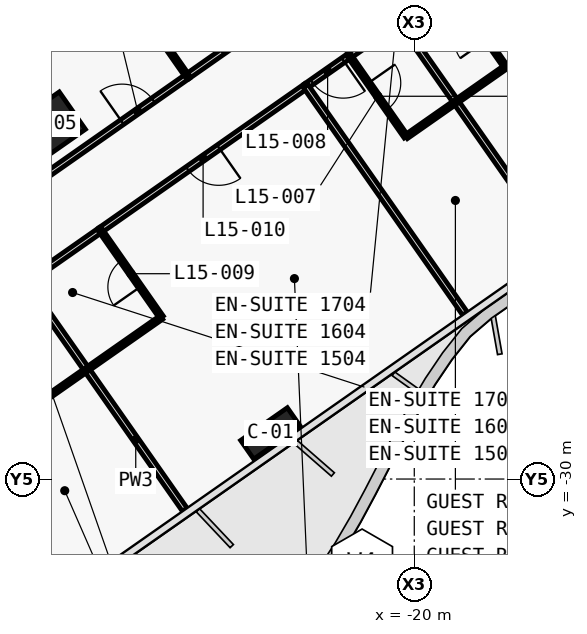
"""IFC4 building model, lengths in metres.
Left out: names, types, materials, properties, quantities, classifications, styles, units other than length and angle.
Written with IfcOpenShell. Run it as: python <this file> out.ifc"""

import sys

from ifc_helpers import new_model, si_unit, direction, frame, frame_2d, origin, origin_2d, place, context, subcontext, project, spatial, rectangle, extrude, element, fill, save


model = new_model("IFC4")
c1 = context("Model", 3, precision=1e-05, world=origin(), true_north=direction((0.0, 1.0)))
c2 = subcontext(c1, "Body", "Model", "MODEL_VIEW")
j1 = project(units=[si_unit("LENGTHUNIT", "METRE"), si_unit("PLANEANGLEUNIT", "RADIAN")], contexts=[c1])
p1 = place(None, origin())
s1 = spatial("IfcSite", under=j1, at=p1, CompositionType="ELEMENT")
p2 = place(p1, origin())
s2 = spatial("IfcBuilding", under=s1, at=p2, CompositionType="ELEMENT")
p3 = place(p2, frame((0.0, 0.0, 79.7)))
s3 = spatial("IfcBuildingStorey", under=s2, at=p3, CompositionType="ELEMENT", Elevation=79.7)
p4 = place(p3, frame((-23.782, -28.799, 0.0), z_axis=(0.0, 0.0, 1.0), x_axis=(-0.819152044289, -0.573576436351, 0.0)))
e1 = element("IfcColumn", 1, at=p4, inside=s3, PredefinedType="COLUMN", context=c2, shape_type="SweptSolid", body=[
    extrude(rectangle(XDim=1.5, YDim=0.6, at=origin_2d()), origin(), (0.0, 0.0, 1.0), 3.6),
])
p5 = place(p3, frame((-29.49, -20.649, 0.0), z_axis=(0.0, 0.0, 1.0), x_axis=(-0.819152044289, -0.573576436351, 0.0)))
e2 = element("IfcColumn", 2, at=p5, inside=s3, PredefinedType="COLUMN", context=c2, shape_type="SweptSolid", body=[
    extrude(rectangle(XDim=1.2, YDim=1.2, at=origin_2d()), origin(), (0.0, 0.0, 1.0), 3.6),
])
p6 = place(p3, frame((-31.375, -23.19, 0.0), z_axis=(0.0, 0.0, 1.0), x_axis=(0.819171118839, 0.573549194106, 0.0)))
e3 = element("IfcWall", 3, at=p6, inside=s3, PredefinedType="PARTITIONING", context=c2, shape_type="SweptSolid", body=[
    extrude(rectangle(XDim=6.603, YDim=0.15, at=frame_2d((3.302, 0.0))), origin(), (0.0, 0.0, 1.0), 2.6),
])
p7 = place(p6, frame((4.502, 0.0, 0.0)))
e4 = element("IfcOpeningElement", 4, at=p7, cuts=e3, PredefinedType="OPENING", context=c2, shape_type="SweptSolid", body=[
    extrude(rectangle(XDim=1.0, YDim=2.1, at=frame_2d((0.5, 1.05))), frame((0.0, 0.085, 0.0), z_axis=(0.0, -1.0, 0.0), x_axis=(1.0, 0.0, 0.0)), (0.0, 0.0, 1.0), 0.17),
])
p8 = place(p3, frame((-25.969, -19.404, 0.0), z_axis=(0.0, 0.0, 1.0), x_axis=(0.819146032251, 0.573585022335, 0.0)))
e5 = element("IfcWall", 5, at=p8, inside=s3, PredefinedType="PARTITIONING", context=c2, shape_type="SweptSolid", body=[
    extrude(rectangle(XDim=2.404, YDim=0.15, at=frame_2d((1.202, 0.0))), origin(), (0.0, 0.0, 1.0), 3.32),
])
p9 = place(p3, frame((-21.706, -18.861, 0.0), z_axis=(0.0, 0.0, 1.0), x_axis=(-0.819060210533, -0.573707566205, 0.0)))
e6 = element("IfcWall", 6, at=p9, inside=s3, PredefinedType="PARTITIONING", context=c2, shape_type="SweptSolid", body=[
    extrude(rectangle(XDim=1.403, YDim=0.15, at=frame_2d((0.702, 0.0))), origin(), (0.0, 0.0, 1.0), 3.32),
])
p10 = place(p9, frame((0.201, 0.0, 0.0)))
e7 = element("IfcOpeningElement", 7, at=p10, cuts=e6, PredefinedType="OPENING", context=c2, shape_type="SweptSolid", body=[
    extrude(rectangle(XDim=1.0, YDim=2.1, at=frame_2d((0.5, 1.05))), frame((0.0, 0.085, 0.0), z_axis=(0.0, -1.0, 0.0), x_axis=(1.0, 0.0, 0.0)), (0.0, 0.0, 1.0), 0.17),
])
p11 = place(p3, frame((-20.395, -17.943, 0.0), z_axis=(0.0, 0.0, 1.0), x_axis=(-0.819189013667, -0.573523634986, 0.0)))
e8 = element("IfcWall", 8, at=p11, inside=s3, PredefinedType="PARTITIONING", context=c2, shape_type="SweptSolid", body=[
    extrude(rectangle(XDim=1.604, YDim=0.15, at=frame_2d((0.802, 0.0))), origin(), (0.0, 0.0, 1.0), 2.6),
])
p12 = place(p3, frame((-22.852, -19.664, 0.0), z_axis=(0.0, 0.0, 1.0), x_axis=(-0.819141582452, -0.573591377113, 0.0)))
e9 = element("IfcWall", 9, at=p12, inside=s3, PredefinedType="PARTITIONING", context=c2, shape_type="SweptSolid", body=[
    extrude(rectangle(XDim=6.603, YDim=0.15, at=frame_2d((3.301, 0.0))), origin(), (0.0, 0.0, 1.0), 2.6),
])
p13 = place(p12, frame((2.802, 0.0, 0.0)))
e10 = element("IfcOpeningElement", 10, at=p13, cuts=e9, PredefinedType="OPENING", context=c2, shape_type="SweptSolid", body=[
    extrude(rectangle(XDim=1.0, YDim=2.1, at=frame_2d((0.5, 1.05))), frame((0.0, 0.085, 0.0), z_axis=(0.0, -1.0, 0.0), x_axis=(1.0, 0.0, 0.0)), (0.0, 0.0, 1.0), 0.17),
])
p14 = place(p3, frame((-28.259, -23.449, 0.0), z_axis=(0.0, 0.0, 1.0), x_axis=(-0.819146032251, -0.573585022335, 0.0)))
e11 = element("IfcWall", 11, at=p14, inside=s3, PredefinedType="PARTITIONING", context=c2, shape_type="SweptSolid", body=[
    extrude(rectangle(XDim=2.404, YDim=0.15, at=frame_2d((1.202, 0.0))), origin(), (0.0, 0.0, 1.0), 3.32),
])
p15 = place(p3, frame((-27.574, -17.11, 0.0), z_axis=(0.0, 0.0, 1.0), x_axis=(0.573591086599, -0.819141785879, 0.0)))
e12 = element("IfcWall", 12, at=p15, inside=s3, PredefinedType="PARTITIONING", context=c2, shape_type="SweptSolid", body=[
    extrude(rectangle(XDim=2.8, YDim=0.12, at=frame_2d((1.4, 0.0))), origin(), (0.0, 0.0, 1.0), 2.6),
])
p16 = place(p15, frame((0.975, 0.0, 0.0)))
e13 = element("IfcOpeningElement", 13, at=p16, cuts=e12, PredefinedType="OPENING", context=c2, shape_type="SweptSolid", body=[
    extrude(rectangle(XDim=0.85, YDim=2.05, at=frame_2d((0.425, 1.025))), frame((0.0, 0.07, 0.0), z_axis=(0.0, -1.0, 0.0), x_axis=(1.0, 0.0, 0.0)), (0.0, 0.0, 1.0), 0.14),
])
p17 = place(p3, frame((-13.752, -22.203, 0.0), z_axis=(0.0, 0.0, 1.0), x_axis=(-0.573594765376, 0.819139209862, 0.0)))
e14 = element("IfcWall", 14, at=p17, inside=s3, PredefinedType="PARTITIONING", context=c2, shape_type="SweptSolid", body=[
    extrude(rectangle(XDim=7.3, YDim=0.15, at=frame_2d((3.65, 0.0))), origin(), (0.0, 0.0, 1.0), 2.5),
])
p18 = place(p3, frame((-18.905, -20.075, 0.0), z_axis=(0.0, 0.0, 1.0), x_axis=(0.819131543282, 0.57360571371, 0.0)))
e15 = element("IfcWall", 15, at=p18, inside=s3, PredefinedType="PARTITIONING", context=c2, shape_type="SweptSolid", body=[
    extrude(rectangle(XDim=1.6, YDim=0.12, at=frame_2d((0.8, 0.0))), origin(), (0.0, 0.0, 1.0), 2.6),
])
p19 = place(p3, frame((-17.594, -19.156, 0.0), z_axis=(0.0, 0.0, 1.0), x_axis=(-0.573600972199, 0.819134863556, 0.0)))
e16 = element("IfcWall", 16, at=p19, inside=s3, PredefinedType="PARTITIONING", context=c2, shape_type="SweptSolid", body=[
    extrude(rectangle(XDim=2.6, YDim=0.12, at=frame_2d((1.3, 0.0))), origin(), (0.0, 0.0, 1.0), 3.32),
])
p20 = place(p19, frame((0.875, 0.0, 0.0)))
e17 = element("IfcOpeningElement", 17, at=p20, cuts=e16, PredefinedType="OPENING", context=c2, shape_type="SweptSolid", body=[
    extrude(rectangle(XDim=0.85, YDim=2.05, at=frame_2d((0.425, 1.025))), frame((0.0, 0.07, 0.0), z_axis=(0.0, -1.0, 0.0), x_axis=(1.0, 0.0, 0.0)), (0.0, 0.0, 1.0), 0.14),
])
p21 = place(p3, frame((-16.594, -23.375, 0.0), z_axis=(0.0, 0.0, 1.0), x_axis=(-0.573600608675, 0.819135118114, 0.0)))
e18 = element("IfcWall", 18, at=p21, inside=s3, PredefinedType="PARTITIONING", context=c2, shape_type="SweptSolid", body=[
    extrude(rectangle(XDim=4.029, YDim=0.15, at=frame_2d((2.015, 0.0))), origin(), (0.0, 0.0, 1.0), 2.6),
])
p22 = place(p3, frame((-18.905, -20.074, 0.0), z_axis=(0.0, 0.0, 1.0), x_axis=(-0.573645091666, 0.819103967032, 0.0)))
e19 = element("IfcWall", 19, at=p22, inside=s3, PredefinedType="PARTITIONING", context=c2, shape_type="SweptSolid", body=[
    extrude(rectangle(XDim=2.6, YDim=0.15, at=frame_2d((1.3, 0.0))), origin(), (0.0, 0.0, 1.0), 2.6),
])
p23 = place(p3, frame((-21.708, -18.862, 0.0), z_axis=(0.0, 0.0, 1.0), x_axis=(0.573537965655, -0.819178980414, 0.0)))
e20 = element("IfcWall", 20, at=p23, inside=s3, PredefinedType="PARTITIONING", context=c2, shape_type="SweptSolid", body=[
    extrude(rectangle(XDim=2.6, YDim=0.12, at=frame_2d((1.3, 0.0))), origin(), (0.0, 0.0, 1.0), 3.32),
])
p24 = place(p23, frame((0.875, 0.0, 0.0)))
e21 = element("IfcOpeningElement", 21, at=p24, cuts=e20, PredefinedType="OPENING", context=c2, shape_type="SweptSolid", body=[
    extrude(rectangle(XDim=0.85, YDim=2.05, at=frame_2d((0.425, 1.025))), frame((0.0, 0.07, 0.0), z_axis=(0.0, -1.0, 0.0), x_axis=(1.0, 0.0, 0.0)), (0.0, 0.0, 1.0), 0.14),
])
p25 = place(p3, frame((-20.215, -20.992, 0.0), z_axis=(0.0, 0.0, 1.0), x_axis=(0.819131543282, 0.57360571371, 0.0)))
e22 = element("IfcWall", 22, at=p25, inside=s3, PredefinedType="PARTITIONING", context=c2, shape_type="SweptSolid", body=[
    extrude(rectangle(XDim=1.6, YDim=0.12, at=frame_2d((0.8, 0.0))), origin(), (0.0, 0.0, 1.0), 2.6),
])
p26 = place(p3, frame((-18.667, -25.645, 0.0), z_axis=(0.0, 0.0, 1.0), x_axis=(-0.573572324301, 0.819154923562, 0.0)))
e23 = element("IfcWall", 23, at=p26, inside=s3, PredefinedType="PARTITIONING", context=c2, shape_type="SweptSolid", body=[
    extrude(rectangle(XDim=7.3, YDim=0.15, at=frame_2d((3.65, 0.0))), origin(), (0.0, 0.0, 1.0), 2.5),
])
p27 = place(p3, frame((-28.62, -27.121, 0.0), z_axis=(0.0, 0.0, 1.0), x_axis=(0.819188907105, 0.573523787192, 0.0)))
e24 = element("IfcWall", 24, at=p27, inside=s3, PredefinedType="PARTITIONING", context=c2, shape_type="SweptSolid", body=[
    extrude(rectangle(XDim=2.4, YDim=0.12, at=frame_2d((1.2, 0.0))), origin(), (0.0, 0.0, 1.0), 3.32),
])
p28 = place(p3, frame((-26.653, -25.743, 0.0), z_axis=(0.0, 0.0, 1.0), x_axis=(-0.573608623498, 0.819129505664, 0.0)))
e25 = element("IfcWall", 25, at=p28, inside=s3, PredefinedType="PARTITIONING", context=c2, shape_type="SweptSolid", body=[
    extrude(rectangle(XDim=2.8, YDim=0.12, at=frame_2d((1.4, 0.0))), origin(), (0.0, 0.0, 1.0), 3.32),
])
p29 = place(p28, frame((0.975, 0.0, 0.0)))
e26 = element("IfcOpeningElement", 26, at=p29, cuts=e25, PredefinedType="OPENING", context=c2, shape_type="SweptSolid", body=[
    extrude(rectangle(XDim=0.85, YDim=2.05, at=frame_2d((0.425, 1.025))), frame((0.0, 0.07, 0.0), z_axis=(0.0, -1.0, 0.0), x_axis=(1.0, 0.0, 0.0)), (0.0, 0.0, 1.0), 0.14),
])
p30 = place(p3, frame((-26.039, -30.807, 0.0), z_axis=(0.0, 0.0, 1.0), x_axis=(-0.573589807488, 0.819142681555, 0.0)))
e27 = element("IfcWall", 27, at=p30, inside=s3, PredefinedType="PARTITIONING", context=c2, shape_type="SweptSolid", body=[
    extrude(rectangle(XDim=4.499, YDim=0.15, at=frame_2d((2.25, 0.0))), origin(), (0.0, 0.0, 1.0), 2.5),
])
p31 = place(p3, frame((-28.62, -27.121, 0.0), z_axis=(0.0, 0.0, 1.0), x_axis=(-0.573608623498, 0.819129505664, 0.0)))
e28 = element("IfcWall", 28, at=p31, inside=s3, PredefinedType="PARTITIONING", context=c2, shape_type="SweptSolid", body=[
    extrude(rectangle(XDim=2.8, YDim=0.15, at=frame_2d((1.4, 0.0))), origin(), (0.0, 0.0, 1.0), 3.32),
])
p32 = place(p3, frame((-30.586, -28.498, 0.0), z_axis=(0.0, 0.0, 1.0), x_axis=(0.819141114317, 0.573592045652, 0.0)))
e29 = element("IfcWall", 29, at=p32, inside=s3, PredefinedType="PARTITIONING", context=c2, shape_type="SweptSolid", body=[
    extrude(rectangle(XDim=2.4, YDim=0.12, at=frame_2d((1.2, 0.0))), origin(), (0.0, 0.0, 1.0), 3.32),
])
p33 = place(p24, origin())
e30 = element("IfcDoor", 30, at=p33, inside=s3, OperationType="SINGLE_SWING_RIGHT", PredefinedType="DOOR", context=c2, shape_type="SweptSolid", body=[
    extrude(rectangle(XDim=0.85, YDim=2.05, at=frame_2d((0.425, 1.025))), frame((0.0, 0.025, 0.0), z_axis=(0.0, -1.0, 0.0), x_axis=(1.0, 0.0, 0.0)), (0.0, 0.0, 1.0), 0.05),
])
fill(e21, e30)
p34 = place(p10, origin())
e31 = element("IfcDoor", 31, at=p34, inside=s3, OperationType="SINGLE_SWING_LEFT", PredefinedType="DOOR", context=c2, shape_type="SweptSolid", body=[
    extrude(rectangle(XDim=1.0, YDim=2.1, at=frame_2d((0.5, 1.05))), frame((0.0, 0.025, 0.0), z_axis=(0.0, -1.0, 0.0), x_axis=(1.0, 0.0, 0.0)), (0.0, 0.0, 1.0), 0.05),
])
fill(e7, e31)
p35 = place(p29, origin())
e32 = element("IfcDoor", 32, at=p35, inside=s3, OperationType="SINGLE_SWING_LEFT", PredefinedType="DOOR", context=c2, shape_type="SweptSolid", body=[
    extrude(rectangle(XDim=0.85, YDim=2.05, at=frame_2d((0.425, 1.025))), frame((0.0, 0.025, 0.0), z_axis=(0.0, -1.0, 0.0), x_axis=(1.0, 0.0, 0.0)), (0.0, 0.0, 1.0), 0.05),
])
fill(e26, e32)
p36 = place(p13, origin())
e33 = element("IfcDoor", 33, at=p36, inside=s3, OperationType="SINGLE_SWING_LEFT", PredefinedType="DOOR", context=c2, shape_type="SweptSolid", body=[
    extrude(rectangle(XDim=1.0, YDim=2.1, at=frame_2d((0.5, 1.05))), frame((0.0, 0.025, 0.0), z_axis=(0.0, -1.0, 0.0), x_axis=(1.0, 0.0, 0.0)), (0.0, 0.0, 1.0), 0.05),
])
fill(e10, e33)
p37 = place(p7, origin())
e34 = element("IfcDoor", 34, at=p37, inside=s3, OperationType="SINGLE_SWING_LEFT", PredefinedType="DOOR", context=c2, shape_type="SweptSolid", body=[
    extrude(rectangle(XDim=1.0, YDim=2.1, at=frame_2d((0.5, 1.05))), frame((0.0, 0.025, 0.0), z_axis=(0.0, -1.0, 0.0), x_axis=(1.0, 0.0, 0.0)), (0.0, 0.0, 1.0), 0.05),
])
fill(e4, e34)
save(model, sys.argv[1])
